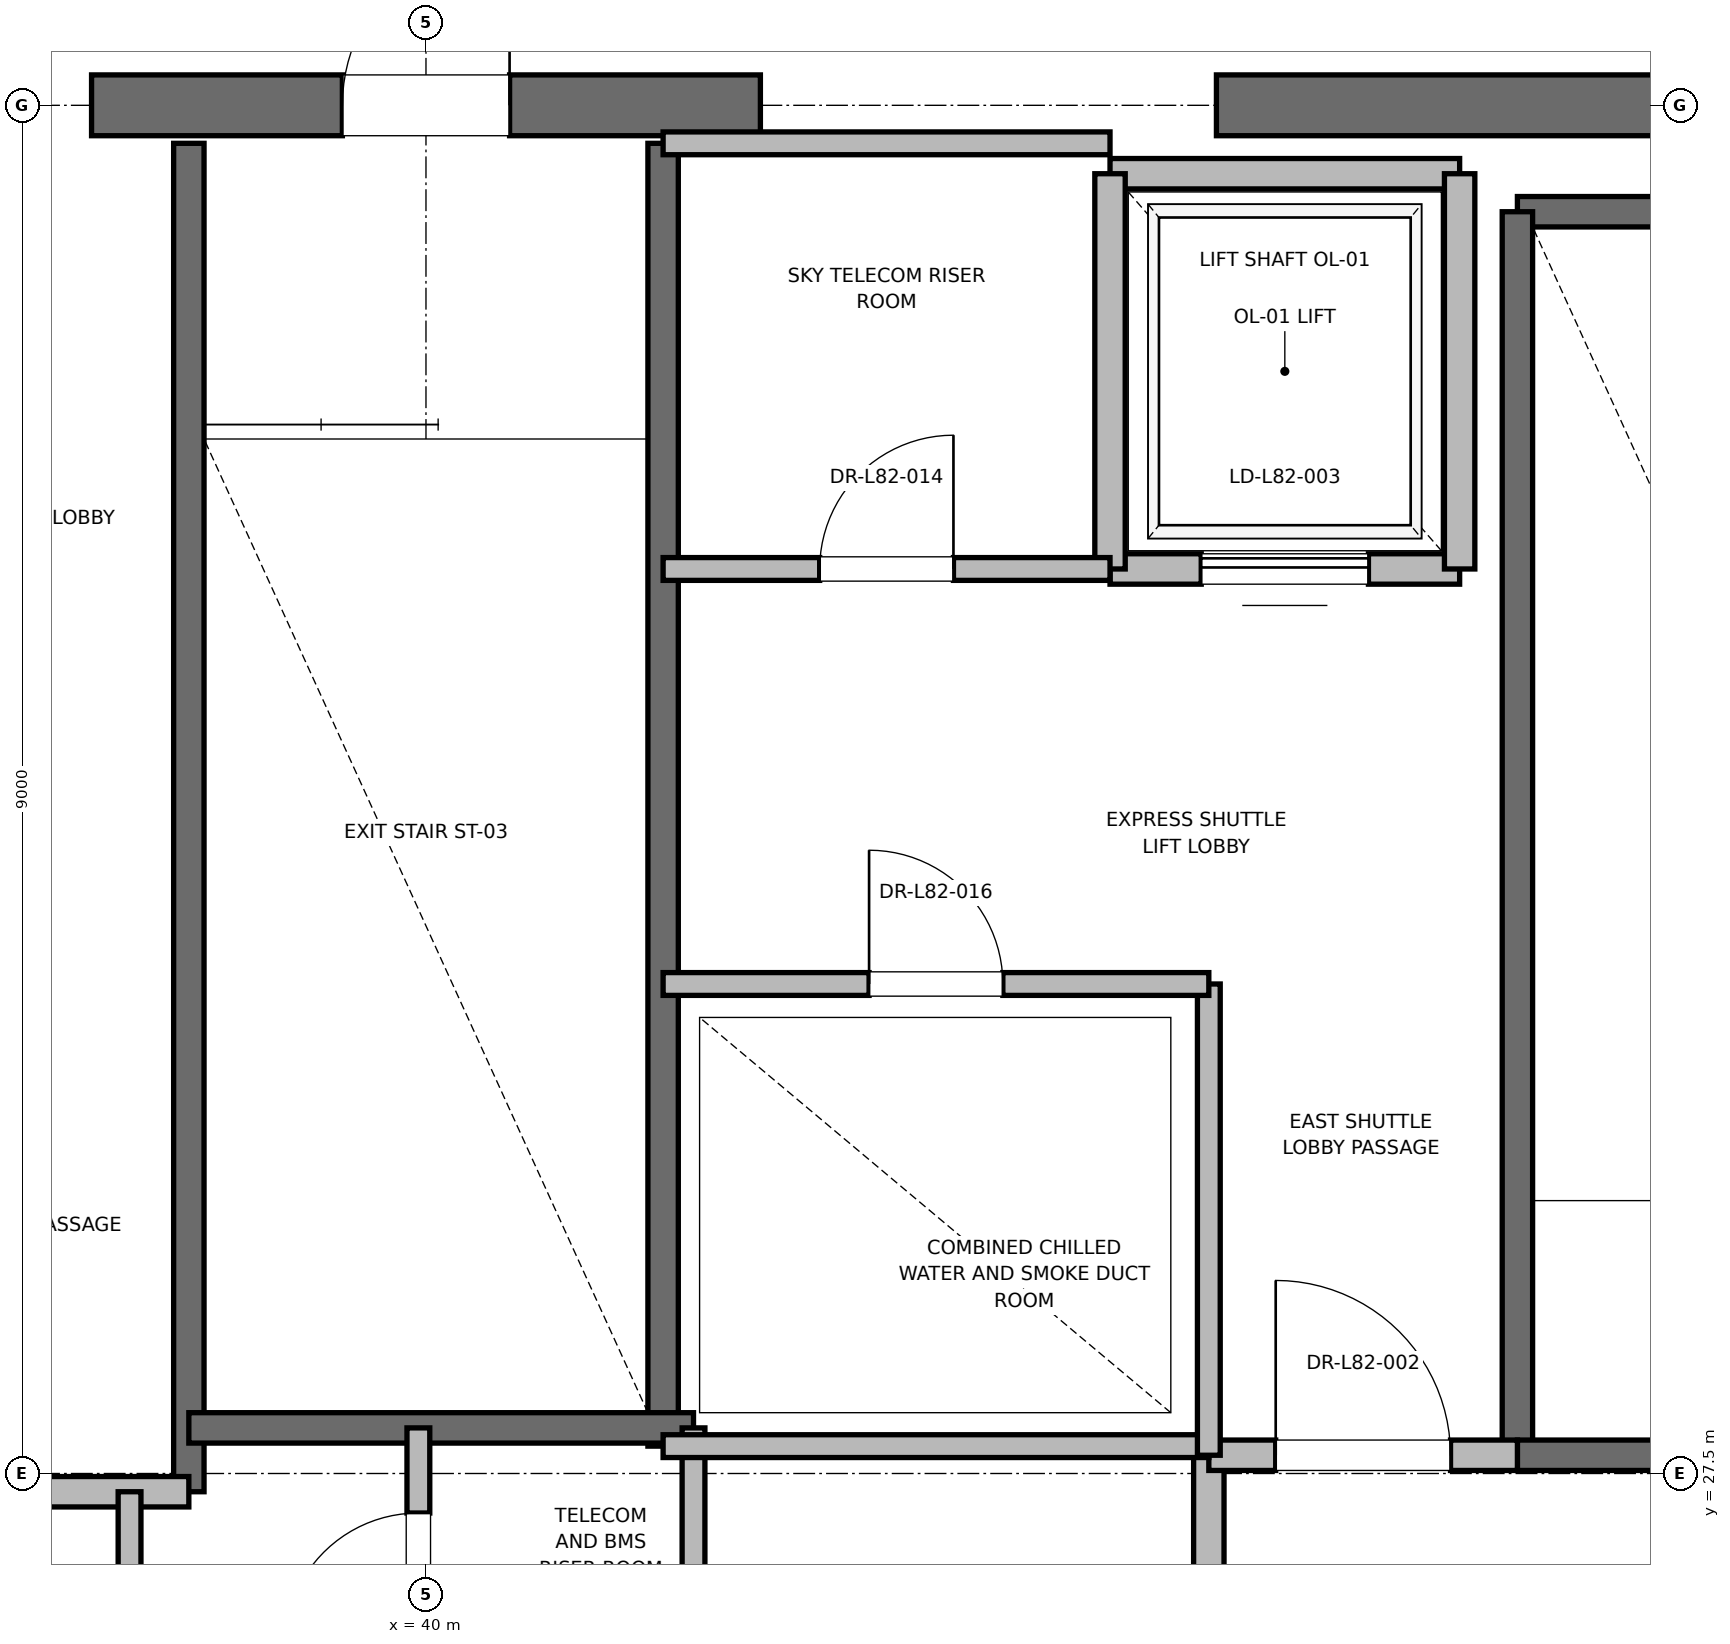
"""IFC4 building model, lengths in metres.
Left out: names, types, materials, properties, quantities, classifications, styles, units other than length and angle.
Written with IfcOpenShell. Run it as: python <this file> out.ifc"""

import sys

from ifc_helpers import new_model, si_unit, direction, frame, frame_2d, origin, place, context, subcontext, project, spatial, rectangle, extrude, element, fill, save


model = new_model("IFC4")
c1 = context("Model", 3, precision=1e-05, world=origin(), true_north=direction((0.0, 1.0)))
c2 = subcontext(c1, "Body", "Model", "MODEL_VIEW")
j1 = project(units=[si_unit("LENGTHUNIT", "METRE"), si_unit("PLANEANGLEUNIT", "RADIAN")], contexts=[c1])
p1 = place(None, origin())
s1 = spatial("IfcSite", under=j1, at=p1, CompositionType="ELEMENT")
p2 = place(p1, origin())
s2 = spatial("IfcBuilding", under=s1, at=p2, CompositionType="ELEMENT")
p3 = place(p2, frame((0.0, 0.0, 354.3)))
s3 = spatial("IfcBuildingStorey", under=s2, at=p3, CompositionType="ELEMENT", Elevation=354.3)
p4 = place(p3, frame((37.8, 36.5, 0.0), z_axis=(0.0, 0.0, 1.0), x_axis=(1.0, 0.0, 0.0)))
e1 = element("IfcWall", 1, at=p4, inside=s3, PredefinedType="SHEAR", context=c2, shape_type="SweptSolid", body=[
    extrude(rectangle(XDim=4.4, YDim=0.4, at=frame_2d((2.2, 0.0))), origin(), (0.0, 0.0, 1.0), 5.24),
])
p5 = place(p4, frame((1.65, 0.0, 0.0)))
e2 = element("IfcOpeningElement", 2, at=p5, cuts=e1, PredefinedType="OPENING", context=c2, shape_type="SweptSolid", body=[
    extrude(rectangle(XDim=1.1, YDim=2.15, at=frame_2d((0.55, 1.075))), frame((0.0, 0.2, 0.0), z_axis=(0.0, -1.0, 0.0), x_axis=(1.0, 0.0, 0.0)), (0.0, 0.0, 1.0), 0.4),
])
p6 = place(p3, frame((45.2, 36.5, 0.0), z_axis=(0.0, 0.0, 1.0), x_axis=(1.0, 0.0, 0.0)))
e3 = element("IfcWall", 3, at=p6, inside=s3, PredefinedType="SHEAR", context=c2, shape_type="SweptSolid", body=[
    extrude(rectangle(XDim=5.8, YDim=0.4, at=frame_2d((2.9, 0.0))), origin(), (0.0, 0.0, 1.0), 5.24),
])
p7 = place(p3, frame((47.18, 35.8, 0.0), z_axis=(0.0, 0.0, 1.0), x_axis=(1.0, 0.0, 0.0)))
e4 = element("IfcWall", 4, at=p7, inside=s3, PredefinedType="SOLIDWALL", context=c2, shape_type="SweptSolid", body=[
    extrude(rectangle(XDim=3.12, YDim=0.2, at=frame_2d((1.56, 0.0))), origin(), (0.0, 0.0, 1.0), 5.24),
])
p8 = place(p3, frame((47.18, 27.62, 0.0), z_axis=(0.0, 0.0, 1.0), x_axis=(0.0, 1.0, 0.0)))
e5 = element("IfcWall", 5, at=p8, inside=s3, PredefinedType="SOLIDWALL", context=c2, shape_type="SweptSolid", body=[
    extrude(rectangle(XDim=8.18, YDim=0.2, at=frame_2d((4.09, 0.0))), origin(), (0.0, 0.0, 1.0), 5.24),
])
p9 = place(p3, frame((47.18, 27.62, 0.0), z_axis=(0.0, 0.0, 1.0), x_axis=(1.0, 0.0, 0.0)))
e6 = element("IfcWall", 6, at=p9, inside=s3, PredefinedType="SOLIDWALL", context=c2, shape_type="SweptSolid", body=[
    extrude(rectangle(XDim=3.12, YDim=0.2, at=frame_2d((1.56, 0.0))), origin(), (0.0, 0.0, 1.0), 5.24),
])
p10 = place(p9, frame((1.01, 0.0, 0.0)))
e7 = element("IfcOpeningElement", 7, at=p10, cuts=e6, PredefinedType="OPENING", context=c2, shape_type="SweptSolid", body=[
    extrude(rectangle(XDim=1.1, YDim=2.15, at=frame_2d((0.55, 1.075))), frame((0.0, 0.1, 0.0), z_axis=(0.0, -1.0, 0.0), x_axis=(1.0, 0.0, 0.0)), (0.0, 0.0, 1.0), 0.2),
])
p11 = place(p3, frame((38.44, 27.38, 0.0), z_axis=(0.0, 0.0, 1.0), x_axis=(0.0, 1.0, 0.0)))
e8 = element("IfcWall", 8, at=p11, inside=s3, PredefinedType="SOLIDWALL", context=c2, shape_type="SweptSolid", body=[
    extrude(rectangle(XDim=8.87, YDim=0.2, at=frame_2d((4.435, 0.0))), origin(), (0.0, 0.0, 1.0), 5.24),
])
p12 = place(p3, frame((41.56, 27.68, 0.0), z_axis=(0.0, 0.0, 1.0), x_axis=(0.0, 1.0, 0.0)))
e9 = element("IfcWall", 9, at=p12, inside=s3, PredefinedType="SOLIDWALL", context=c2, shape_type="SweptSolid", body=[
    extrude(rectangle(XDim=8.57, YDim=0.2, at=frame_2d((4.285, 0.0))), origin(), (0.0, 0.0, 1.0), 5.24),
])
p13 = place(p3, frame((38.44, 27.8, 0.0), z_axis=(0.0, 0.0, 1.0), x_axis=(1.0, 0.0, 0.0)))
e10 = element("IfcWall", 10, at=p13, inside=s3, PredefinedType="SOLIDWALL", context=c2, shape_type="SweptSolid", body=[
    extrude(rectangle(XDim=3.32, YDim=0.2, at=frame_2d((1.66, 0.0))), origin(), (0.0, 0.0, 1.0), 5.24),
])
p14 = place(p3, frame((32.82, 27.38, 0.0), z_axis=(0.0, 0.0, 1.0), x_axis=(1.0, 0.0, 0.0)))
e11 = element("IfcWall", 11, at=p14, inside=s3, PredefinedType="PARTITIONING", context=c2, shape_type="SweptSolid", body=[
    extrude(rectangle(XDim=5.62, YDim=0.2, at=frame_2d((2.81, 0.0))), origin(), (0.0, 0.0, 1.0), 5.24),
])
p15 = place(p3, frame((45.15, 24.25, 0.0), z_axis=(0.0, 0.0, 1.0), x_axis=(0.0, 1.0, 0.0)))
e12 = element("IfcWall", 12, at=p15, inside=s3, PredefinedType="PARTITIONING", context=c2, shape_type="SweptSolid", body=[
    extrude(rectangle(XDim=3.37, YDim=0.2, at=frame_2d((1.685, 0.0))), origin(), (0.0, 0.0, 1.0), 5.24),
])
p16 = place(p3, frame((45.15, 27.62, 0.0), z_axis=(0.0, 0.0, 1.0), x_axis=(1.0, 0.0, 0.0)))
e13 = element("IfcWall", 13, at=p16, inside=s3, PredefinedType="PARTITIONING", context=c2, shape_type="SweptSolid", body=[
    extrude(rectangle(XDim=2.03, YDim=0.2, at=frame_2d((1.015, 0.0))), origin(), (0.0, 0.0, 1.0), 5.24),
])
p17 = place(p16, frame((0.44, 0.0, 0.0)))
e14 = element("IfcOpeningElement", 14, at=p17, cuts=e13, PredefinedType="OPENING", context=c2, shape_type="SweptSolid", body=[
    extrude(rectangle(XDim=1.15, YDim=2.2, at=frame_2d((0.575, 1.1))), frame((0.0, 0.1, 0.0), z_axis=(0.0, -1.0, 0.0), x_axis=(1.0, 0.0, 0.0)), (0.0, 0.0, 1.0), 0.2),
])
p18 = place(p3, frame((44.5, 33.45, 0.0), z_axis=(0.0, 0.0, 1.0), x_axis=(1.0, 0.0, 0.0)))
e15 = element("IfcWall", 15, at=p18, inside=s3, PredefinedType="SOLIDWALL", context=c2, shape_type="SweptSolid", body=[
    extrude(rectangle(XDim=2.3, YDim=0.2, at=frame_2d((1.15, 0.0))), origin(), (0.0, 0.0, 1.0), 5.24),
])
p19 = place(p18, frame((0.6, 0.0, 0.0)))
e16 = element("IfcOpeningElement", 16, at=p19, cuts=e15, PredefinedType="OPENING", context=c2, shape_type="SweptSolid", body=[
    extrude(rectangle(XDim=1.1, YDim=2.2, at=frame_2d((0.55, 1.1))), frame((0.0, 0.1, 0.0), z_axis=(0.0, -1.0, 0.0), x_axis=(1.0, 0.0, 0.0)), (0.0, 0.0, 1.0), 0.2),
])
p20 = place(p3, frame((46.8, 36.05, 0.0), z_axis=(0.0, 0.0, 1.0), x_axis=(-1.0, 0.0, 0.0)))
e17 = element("IfcWall", 17, at=p20, inside=s3, PredefinedType="SOLIDWALL", context=c2, shape_type="SweptSolid", body=[
    extrude(rectangle(XDim=2.3, YDim=0.2, at=frame_2d((1.15, 0.0))), origin(), (0.0, 0.0, 1.0), 4.32),
])
p21 = place(p3, frame((44.5, 36.05, 0.0), z_axis=(0.0, 0.0, 1.0), x_axis=(0.0, -1.0, 0.0)))
e18 = element("IfcWall", 18, at=p21, inside=s3, PredefinedType="SOLIDWALL", context=c2, shape_type="SweptSolid", body=[
    extrude(rectangle(XDim=2.6, YDim=0.2, at=frame_2d((1.3, 0.0))), origin(), (0.0, 0.0, 1.0), 4.32),
])
p22 = place(p3, frame((46.8, 33.45, 0.0), z_axis=(0.0, 0.0, 1.0), x_axis=(0.0, 1.0, 0.0)))
e19 = element("IfcWall", 19, at=p22, inside=s3, PredefinedType="SOLIDWALL", context=c2, shape_type="SweptSolid", body=[
    extrude(rectangle(XDim=2.6, YDim=0.2, at=frame_2d((1.3, 0.0))), origin(), (0.0, 0.0, 1.0), 5.24),
])
p23 = place(p3, frame((41.76, 23.8, 0.0), z_axis=(0.0, 0.0, 1.0), x_axis=(0.0, 1.0, 0.0)))
e20 = element("IfcWall", 20, at=p23, inside=s3, PredefinedType="PARTITIONING", context=c2, shape_type="SweptSolid", body=[
    extrude(rectangle(XDim=4.0, YDim=0.15, at=frame_2d((2.0, 0.0))), origin(), (0.0, 0.0, 1.0), 2.85),
])
p24 = place(p3, frame((39.95, 25.8, 0.0), z_axis=(0.0, 0.0, 1.0), x_axis=(0.0, 1.0, 0.0)))
e21 = element("IfcWall", 21, at=p24, inside=s3, PredefinedType="PARTITIONING", context=c2, shape_type="SweptSolid", body=[
    extrude(rectangle(XDim=2.0, YDim=0.15, at=frame_2d((1.0, 0.0))), origin(), (0.0, 0.0, 1.0), 2.85),
])
p25 = place(p24, frame((0.56, 0.0, 0.0)))
e22 = element("IfcOpeningElement", 22, at=p25, cuts=e21, PredefinedType="OPENING", context=c2, shape_type="SweptSolid", body=[
    extrude(rectangle(XDim=0.88, YDim=2.1, at=frame_2d((0.44, 1.05))), frame((0.0, 0.075, 0.0), z_axis=(0.0, -1.0, 0.0), x_axis=(1.0, 0.0, 0.0)), (0.0, 0.0, 1.0), 0.15),
])
p26 = place(p3, frame((38.05, 18.6, 0.0), z_axis=(0.0, 0.0, 1.0), x_axis=(0.0, 1.0, 0.0)))
e23 = element("IfcWall", 23, at=p26, inside=s3, PredefinedType="PARTITIONING", context=c2, shape_type="SweptSolid", body=[
    extrude(rectangle(XDim=8.78, YDim=0.15, at=frame_2d((4.39, 0.0))), origin(), (0.0, 0.0, 1.0), 2.85),
])
p27 = place(p26, frame((3.95, 0.0, 0.0)))
e24 = element("IfcOpeningElement", 24, at=p27, cuts=e23, PredefinedType="OPENING", context=c2, shape_type="SweptSolid", body=[
    extrude(rectangle(XDim=0.88, YDim=2.1, at=frame_2d((0.44, 1.05))), frame((0.0, 0.075, 0.0), z_axis=(0.0, -1.0, 0.0), x_axis=(1.0, 0.0, 0.0)), (0.0, 0.0, 1.0), 0.15),
])
p28 = place(p3, frame((41.56, 27.68, 0.0), z_axis=(0.0, 0.0, 1.0), x_axis=(1.0, 0.0, 0.0)))
e25 = element("IfcWall", 25, at=p28, inside=s3, PredefinedType="PARTITIONING", context=c2, shape_type="SweptSolid", body=[
    extrude(rectangle(XDim=3.59, YDim=0.15, at=frame_2d((1.795, 0.0))), origin(), (0.0, 0.0, 1.0), 2.85),
])
p29 = place(p3, frame((45.15, 27.62, 0.0), z_axis=(0.0, 0.0, 1.0), x_axis=(0.0, 1.0, 0.0)))
e26 = element("IfcWall", 26, at=p29, inside=s3, PredefinedType="PARTITIONING", context=c2, shape_type="SweptSolid", body=[
    extrude(rectangle(XDim=3.1, YDim=0.15, at=frame_2d((1.55, 0.0))), origin(), (0.0, 0.0, 1.0), 2.85),
])
p30 = place(p3, frame((41.56, 30.72, 0.0), z_axis=(0.0, 0.0, 1.0), x_axis=(1.0, 0.0, 0.0)))
e27 = element("IfcWall", 27, at=p30, inside=s3, PredefinedType="PARTITIONING", context=c2, shape_type="SweptSolid", body=[
    extrude(rectangle(XDim=3.59, YDim=0.15, at=frame_2d((1.795, 0.0))), origin(), (0.0, 0.0, 1.0), 2.85),
])
p31 = place(p30, frame((1.355, 0.0, 0.0)))
e28 = element("IfcOpeningElement", 28, at=p31, cuts=e27, PredefinedType="OPENING", context=c2, shape_type="SweptSolid", body=[
    extrude(rectangle(XDim=0.88, YDim=2.1, at=frame_2d((0.44, 1.05))), frame((0.0, 0.075, 0.0), z_axis=(0.0, -1.0, 0.0), x_axis=(1.0, 0.0, 0.0)), (0.0, 0.0, 1.0), 0.15),
])
p32 = place(p3, frame((41.56, 36.25, 0.0), z_axis=(0.0, 0.0, 1.0), x_axis=(1.0, 0.0, 0.0)))
e29 = element("IfcWall", 29, at=p32, inside=s3, PredefinedType="PARTITIONING", context=c2, shape_type="SweptSolid", body=[
    extrude(rectangle(XDim=2.94, YDim=0.15, at=frame_2d((1.47, 0.0))), origin(), (0.0, 0.0, 1.0), 2.85),
])
p33 = place(p3, frame((41.56, 33.45, 0.0), z_axis=(0.0, 0.0, 1.0), x_axis=(1.0, 0.0, 0.0)))
e30 = element("IfcWall", 30, at=p33, inside=s3, PredefinedType="PARTITIONING", context=c2, shape_type="SweptSolid", body=[
    extrude(rectangle(XDim=2.94, YDim=0.15, at=frame_2d((1.47, 0.0))), origin(), (0.0, 0.0, 1.0), 2.85),
])
p34 = place(p33, frame((1.03, 0.0, 0.0)))
e31 = element("IfcOpeningElement", 31, at=p34, cuts=e30, PredefinedType="OPENING", context=c2, shape_type="SweptSolid", body=[
    extrude(rectangle(XDim=0.88, YDim=2.1, at=frame_2d((0.44, 1.05))), frame((0.0, 0.075, 0.0), z_axis=(0.0, -1.0, 0.0), x_axis=(1.0, 0.0, 0.0)), (0.0, 0.0, 1.0), 0.15),
])
p35 = place(p5, origin())
e32 = element("IfcDoor", 32, at=p35, inside=s3, OperationType="SINGLE_SWING_RIGHT", PredefinedType="DOOR", context=c2, shape_type="SweptSolid", body=[
    extrude(rectangle(XDim=1.1, YDim=2.15, at=frame_2d((0.55, 1.075))), frame((0.0, 0.025, 0.0), z_axis=(0.0, -1.0, 0.0), x_axis=(1.0, 0.0, 0.0)), (0.0, 0.0, 1.0), 0.05),
])
fill(e2, e32)
p36 = place(p17, origin())
e33 = element("IfcDoor", 33, at=p36, inside=s3, OperationType="SINGLE_SWING_LEFT", PredefinedType="DOOR", context=c2, shape_type="SweptSolid", body=[
    extrude(rectangle(XDim=1.15, YDim=2.2, at=frame_2d((0.575, 1.1))), frame((0.0, 0.025, 0.0), z_axis=(0.0, -1.0, 0.0), x_axis=(1.0, 0.0, 0.0)), (0.0, 0.0, 1.0), 0.05),
])
fill(e14, e33)
p37 = place(p19, origin())
e34 = element("IfcDoor", 34, at=p37, inside=s3, OperationType="SLIDING_TO_RIGHT", PredefinedType="DOOR", context=c2, shape_type="SweptSolid", body=[
    extrude(rectangle(XDim=1.1, YDim=2.2, at=frame_2d((0.55, 1.1))), frame((0.0, 0.025, 0.0), z_axis=(0.0, -1.0, 0.0), x_axis=(1.0, 0.0, 0.0)), (0.0, 0.0, 1.0), 0.05),
])
fill(e16, e34)
p38 = place(p25, origin())
e35 = element("IfcDoor", 35, at=p38, inside=s3, OperationType="SINGLE_SWING_LEFT", PredefinedType="DOOR", context=c2, shape_type="SweptSolid", body=[
    extrude(rectangle(XDim=0.88, YDim=2.1, at=frame_2d((0.44, 1.05))), frame((0.0, 0.025, 0.0), z_axis=(0.0, -1.0, 0.0), x_axis=(1.0, 0.0, 0.0)), (0.0, 0.0, 1.0), 0.05),
])
fill(e22, e35)
p39 = place(p31, origin())
e36 = element("IfcDoor", 36, at=p39, inside=s3, OperationType="SINGLE_SWING_LEFT", PredefinedType="DOOR", context=c2, shape_type="SweptSolid", body=[
    extrude(rectangle(XDim=0.88, YDim=2.1, at=frame_2d((0.44, 1.05))), frame((0.0, 0.025, 0.0), z_axis=(0.0, -1.0, 0.0), x_axis=(1.0, 0.0, 0.0)), (0.0, 0.0, 1.0), 0.05),
])
fill(e28, e36)
p40 = place(p34, origin())
e37 = element("IfcDoor", 37, at=p40, inside=s3, OperationType="SINGLE_SWING_RIGHT", PredefinedType="DOOR", context=c2, shape_type="SweptSolid", body=[
    extrude(rectangle(XDim=0.88, YDim=2.1, at=frame_2d((0.44, 1.05))), frame((0.0, 0.025, 0.0), z_axis=(0.0, -1.0, 0.0), x_axis=(1.0, 0.0, 0.0)), (0.0, 0.0, 1.0), 0.05),
])
fill(e31, e37)
save(model, sys.argv[1])
